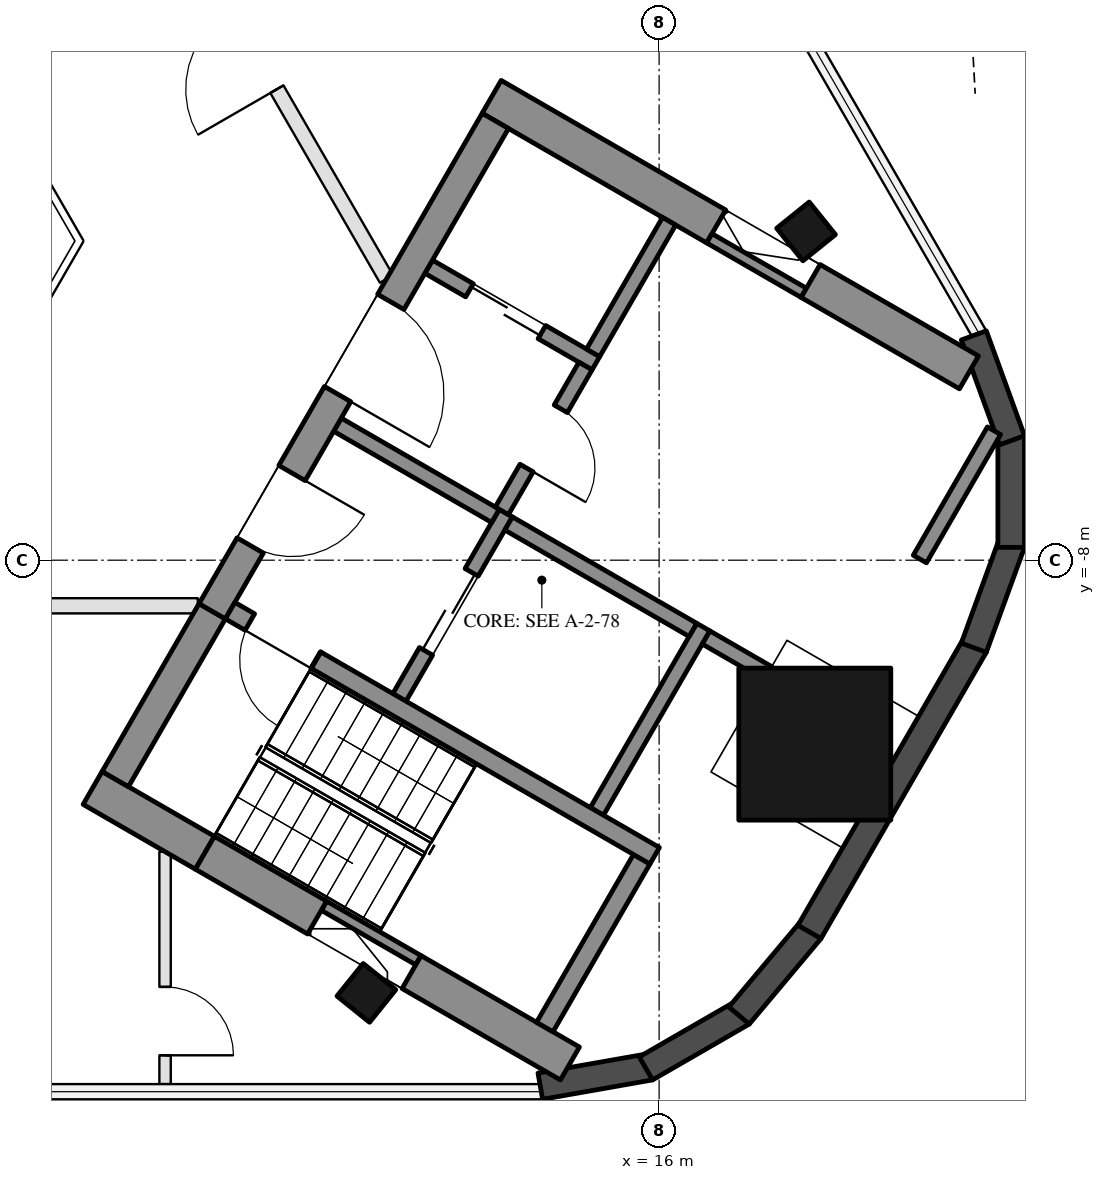
"""IFC4 building model, lengths in metres.
Left out: names, types, materials, properties, quantities, classifications, styles, units other than length and angle.
Written with IfcOpenShell. Run it as: python <this file> out.ifc"""

import sys

from ifc_helpers import new_model, si_unit, direction, frame, frame_2d, origin, origin_2d, place, context, subcontext, project, spatial, rectangle, hollow_rectangle, extrude, boolean, halfspace, element, fill, save


model = new_model("IFC4")
c1 = context("Model", 3, precision=1e-05, world=origin(), true_north=direction((0.0, 1.0)))
c2 = subcontext(c1, "Body", "Model", "MODEL_VIEW")
j1 = project(units=[si_unit("LENGTHUNIT", "METRE"), si_unit("PLANEANGLEUNIT", "RADIAN")], contexts=[c1])
p1 = place(None, origin())
s1 = spatial("IfcSite", under=j1, at=p1, CompositionType="ELEMENT")
p2 = place(p1, origin())
s2 = spatial("IfcBuilding", under=s1, at=p2, CompositionType="ELEMENT")
p3 = place(p2, frame((0.0, 0.0, 331.8)))
s3 = spatial("IfcBuildingStorey", under=s2, at=p3, CompositionType="ELEMENT", Elevation=331.8)
p4 = place(p3, frame((12.148, -13.693, 0.0), z_axis=(-0.069800876117, 0.086709858406, 0.993785307875), x_axis=(0.997556680816, 0.003154583171, 0.069790523453)))
e1 = element("IfcColumn", 1, at=p4, inside=s3, PredefinedType="COLUMN", context=c2, shape_type="SweptSolid", body=[
    boolean("DIFFERENCE", boolean("DIFFERENCE", extrude(hollow_rectangle(XDim=0.55, YDim=0.55, WallThickness=0.025, at=origin_2d()), origin(), (0.0, 0.0, 1.0), 6.541), halfspace(frame((0.0, 0.0, 0.018), z_axis=(0.0, 0.0, 1.0), x_axis=(1.0, 0.0, 0.0)), True)), halfspace(frame((0.0, 0.0, 6.517), z_axis=(0.0, 0.0, 1.0), x_axis=(1.0, 0.0, 0.0)), False)),
])
p5 = place(p3, frame((17.933, -3.674, 0.0), z_axis=(-0.110001598566, 0.017095599641, 0.993784377411), x_axis=(0.496031401637, -0.865495011969, 0.069794217853)))
e2 = element("IfcColumn", 2, at=p5, inside=s3, PredefinedType="COLUMN", context=c2, shape_type="SweptSolid", body=[
    boolean("DIFFERENCE", boolean("DIFFERENCE", extrude(hollow_rectangle(XDim=0.55, YDim=0.55, WallThickness=0.025, at=origin_2d()), origin(), (0.0, 0.0, 1.0), 6.541), halfspace(frame((0.0, 0.0, 0.018), z_axis=(0.0, 0.0, 1.0), x_axis=(1.0, 0.0, 0.0)), True)), halfspace(frame((0.0, 0.0, 6.517), z_axis=(0.0, 0.0, 1.0), x_axis=(1.0, 0.0, 0.0)), False)),
])
p6 = place(p3, frame((18.048, -10.42, 0.0), z_axis=(-0.110162754727, 0.063631378111, 0.991874596504), x_axis=(-0.5001252871, -0.865953057134, 6.661194e-06)))
e3 = element("IfcColumn", 3, at=p6, inside=s3, PredefinedType="COLUMN", context=c2, shape_type="SweptSolid", body=[
    boolean("DIFFERENCE", boolean("DIFFERENCE", extrude(hollow_rectangle(XDim=2.0, YDim=2.0, WallThickness=0.05, at=origin_2d()), origin(), (0.0, 0.0, 1.0), 6.553), halfspace(frame((0.0, 0.0, 0.049), z_axis=(0.0, 0.0, 1.0), x_axis=(1.0, 0.0, 0.0)), True)), halfspace(frame((0.0, 0.0, 6.487), z_axis=(0.0, 0.0, 1.0), x_axis=(1.0, 0.0, 0.0)), False)),
])
p7 = place(p3, frame((14.437, -14.921, 0.0), z_axis=(0.0, 0.0, 1.0), x_axis=(0.984823698616, 0.173557721363, 0.0)))
e4 = element("IfcWall", 4, at=p7, inside=s3, PredefinedType="SOLIDWALL", context=c2, shape_type="SweptSolid", body=[
    extrude(rectangle(XDim=1.469, YDim=0.35, at=frame_2d((0.734, 0.0))), origin(), (0.0, 0.0, 1.0), 6.25),
])
for number, where, z_axis, x_axis in (
    (5, (15.826, -14.687, 0.0), (0.0, 0.0, 1.0), (0.866, 0.5, 0.0)),
    (6, (17.052, -13.991, 0.0), (0.0, 0.0, 1.0), (0.643, 0.766, 0.0)),
):
    element("IfcWall", number, at=place(p3, frame(where, z_axis=z_axis, x_axis=x_axis)), inside=s3, PredefinedType="SOLIDWALL", context=c2, shape_type="SweptSolid", body=[
        extrude(rectangle(XDim=1.469, YDim=0.35, at=frame_2d((0.734, 0.0))), origin(), (0.0, 0.0, 1.0), 6.25),
    ])
p8 = place(p3, frame((17.978, -12.891, 0.0), z_axis=(0.0, 0.0, 1.0), x_axis=(0.500013916395, 0.866017369001, 0.0)))
e7 = element("IfcWall", 7, at=p8, inside=s3, PredefinedType="SOLIDWALL", context=c2, shape_type="SweptSolid", body=[
    extrude(rectangle(XDim=4.351, YDim=0.35, at=frame_2d((2.175, 0.0))), origin(), (0.0, 0.0, 1.0), 6.25),
])
for number, where, z_axis, x_axis in (
    (8, (20.14, -9.151, 0.0), (0.0, 0.0, 1.0), (0.342, 0.94, 0.0)),
    (9, (20.632, -7.831, 0.0), (0.0, 0.0, 1.0), (0.0, 1.0, 0.0)),
    (10, (20.643, -6.422, 0.0), (0.0, 0.0, 1.0), (-0.342, 0.94, 0.0)),
):
    element("IfcWall", number, at=place(p3, frame(where, z_axis=z_axis, x_axis=x_axis)), inside=s3, PredefinedType="SOLIDWALL", context=c2, shape_type="SweptSolid", body=[
        extrude(rectangle(XDim=1.469, YDim=0.35, at=frame_2d((0.734, 0.0))), origin(), (0.0, 0.0, 1.0), 6.25),
    ])
p9 = place(p3, frame((11.59, -12.546, 0.0), z_axis=(0.0, 0.0, 1.0), x_axis=(0.866077922096, -0.499909024581, 0.0)))
e11 = element("IfcWall", 11, at=p9, inside=s3, PredefinedType="SHEAR", context=c2, shape_type="SweptSolid", body=[
    extrude(rectangle(XDim=1.435, YDim=0.14, at=frame_2d((0.717, 0.0))), origin(), (0.0, 0.0, 1.0), 6.25),
])
p10 = place(p3, frame((12.743, -13.419, 0.0), z_axis=(0.0, 0.0, 1.0), x_axis=(0.866055480043, -0.499947902773, 0.0)))
e12 = element("IfcWall", 12, at=p10, inside=s3, PredefinedType="SHEAR", context=c2, shape_type="SweptSolid", body=[
    extrude(rectangle(XDim=2.406, YDim=0.5, at=frame_2d((1.203, 0.0))), origin(), (0.0, 0.0, 1.0), 6.25),
])
p11 = place(p3, frame((13.797, -1.903, 0.0), z_axis=(0.0, 0.0, 1.0), x_axis=(0.866036589769, -0.499980624807, 0.0)))
e13 = element("IfcWall", 13, at=p11, inside=s3, PredefinedType="SHEAR", context=c2, shape_type="SweptSolid", body=[
    extrude(rectangle(XDim=3.411, YDim=0.5, at=frame_2d((1.706, 0.0))), origin(), (0.0, 0.0, 1.0), 6.25),
])
p12 = place(p3, frame((16.66, -3.765, 0.0), z_axis=(0.0, 0.0, 1.0), x_axis=(0.866077922096, -0.499909024581, 0.0)))
e14 = element("IfcWall", 14, at=p12, inside=s3, PredefinedType="SHEAR", context=c2, shape_type="SweptSolid", body=[
    extrude(rectangle(XDim=1.435, YDim=0.14, at=frame_2d((0.717, 0.0))), origin(), (0.0, 0.0, 1.0), 6.25),
])
p13 = place(p3, frame((17.993, -4.326, 0.0), z_axis=(0.0, 0.0, 1.0), x_axis=(0.866030114221, -0.499991841196, 0.0)))
e15 = element("IfcWall", 15, at=p13, inside=s3, PredefinedType="SHEAR", context=c2, shape_type="SweptSolid", body=[
    extrude(rectangle(XDim=2.406, YDim=0.5, at=frame_2d((1.203, 0.0))), origin(), (0.0, 0.0, 1.0), 6.25),
])
p14 = place(p3, frame((14.496, -14.143, 0.0), z_axis=(0.0, 0.0, 1.0), x_axis=(0.500062241894, 0.865989465428, 0.0)))
e16 = element("IfcWall", 16, at=p14, inside=s3, PredefinedType="SHEAR", context=c2, shape_type="SweptSolid", body=[
    extrude(rectangle(XDim=2.55, YDim=0.25, at=frame_2d((1.275, 0.0))), origin(), (0.0, 0.0, 1.0), 6.25),
])
p15 = place(p3, frame((15.181, -11.305, 0.0), z_axis=(0.0, 0.0, 1.0), x_axis=(0.49994636267, 0.866056369097, 0.0)))
e17 = element("IfcWall", 17, at=p15, inside=s3, PredefinedType="SHEAR", context=c2, shape_type="SweptSolid", body=[
    extrude(rectangle(XDim=2.8, YDim=0.2, at=frame_2d((1.4, 0.0))), origin(), (0.0, 0.0, 1.0), 6.25),
])
p16 = place(p3, frame((12.583, -9.805, 0.0), z_axis=(0.0, 0.0, 1.0), x_axis=(0.49994636267, 0.866056369097, 0.0)))
e18 = element("IfcWall", 18, at=p16, inside=s3, PredefinedType="SHEAR", context=c2, shape_type="SweptSolid", body=[
    extrude(rectangle(XDim=2.8, YDim=0.2, at=frame_2d((1.4, 0.0))), origin(), (0.0, 0.0, 1.0), 6.25),
])
p17 = place(p16, frame((0.7, 0.0, 0.0)))
e19 = element("IfcOpeningElement", 19, at=p17, cuts=e18, PredefinedType="OPENING", context=c2, shape_type="SweptSolid", body=[
    extrude(rectangle(XDim=1.2, YDim=2.1, at=frame_2d((0.6, 1.05))), frame((0.0, 0.11, 0.0), z_axis=(0.0, -1.0, 0.0), x_axis=(1.0, 0.0, 0.0)), (0.0, 0.0, 1.0), 0.22),
])
p18 = place(p3, frame((11.768, -6.217, 0.0), z_axis=(0.0, 0.0, 1.0), x_axis=(0.866050077142, -0.499957262057, 0.0)))
e20 = element("IfcWall", 20, at=p18, inside=s3, PredefinedType="SHEAR", context=c2, shape_type="SweptSolid", body=[
    extrude(rectangle(XDim=2.4, YDim=0.2, at=frame_2d((1.2, 0.0))), origin(), (0.0, 0.0, 1.0), 6.25),
])
p19 = place(p3, frame((14.02, -7.517, 0.0), z_axis=(0.0, 0.0, 1.0), x_axis=(0.866034573852, -0.49998411664, 0.0)))
e21 = element("IfcWall", 21, at=p19, inside=s3, PredefinedType="SHEAR", context=c2, shape_type="SweptSolid", body=[
    extrude(rectangle(XDim=2.8, YDim=0.2, at=frame_2d((1.4, 0.0))), origin(), (0.0, 0.0, 1.0), 6.25),
])
p20 = place(p3, frame((12.968, -4.138, 0.0), z_axis=(0.0, 0.0, 1.0), x_axis=(0.866022320763, -0.500005339912, 0.0)))
e22 = element("IfcWall", 22, at=p20, inside=s3, PredefinedType="SHEAR", context=c2, shape_type="SweptSolid", body=[
    extrude(rectangle(XDim=2.54, YDim=0.2, at=frame_2d((1.27, 0.0))), origin(), (0.0, 0.0, 1.0), 6.25),
])
p21 = place(p20, frame((0.62, 0.0, 0.0)))
e23 = element("IfcOpeningElement", 23, at=p21, cuts=e22, PredefinedType="OPENING", context=c2, shape_type="SweptSolid", body=[
    extrude(rectangle(XDim=1.1, YDim=2.1, at=frame_2d((0.55, 1.05))), frame((0.0, 0.11, 0.0), z_axis=(0.0, -1.0, 0.0), x_axis=(1.0, 0.0, 0.0)), (0.0, 0.0, 1.0), 0.22),
])
p22 = place(p3, frame((13.931, -7.35, 0.0), z_axis=(0.0, 0.0, 1.0), x_axis=(0.50002983664, 0.866008176907, 0.0)))
e24 = element("IfcWall", 24, at=p22, inside=s3, PredefinedType="SHEAR", context=c2, shape_type="SweptSolid", body=[
    extrude(rectangle(XDim=2.2, YDim=0.2, at=frame_2d((1.1, 0.0))), origin(), (0.0, 0.0, 1.0), 6.25),
])
p23 = place(p22, frame((0.65, 0.0, 0.0)))
e25 = element("IfcOpeningElement", 25, at=p23, cuts=e24, PredefinedType="OPENING", context=c2, shape_type="SweptSolid", body=[
    extrude(rectangle(XDim=0.9, YDim=2.1, at=frame_2d((0.45, 1.05))), frame((0.0, 0.11, 0.0), z_axis=(0.0, -1.0, 0.0), x_axis=(1.0, 0.0, 0.0)), (0.0, 0.0, 1.0), 0.22),
])
p24 = place(p3, frame((16.618, -9.017, 0.0), z_axis=(0.0, 0.0, 1.0), x_axis=(0.8660774803, -0.499909789979, 0.0)))
e26 = element("IfcWall", 26, at=p24, inside=s3, PredefinedType="SHEAR", context=c2, shape_type="SweptSolid", body=[
    extrude(rectangle(XDim=0.94, YDim=0.2, at=frame_2d((0.47, 0.0))), origin(), (0.0, 0.0, 1.0), 6.25),
])
p25 = place(p3, frame((15.131, -5.272, 0.0), z_axis=(0.0, 0.0, 1.0), x_axis=(0.499972520799, 0.866041268327, 0.0)))
e27 = element("IfcWall", 27, at=p25, inside=s3, PredefinedType="SHEAR", context=c2, shape_type="SweptSolid", body=[
    extrude(rectangle(XDim=2.0, YDim=0.2, at=frame_2d((1.0, 0.0))), origin(), (0.0, 0.0, 1.0), 6.25),
])
p26 = place(p3, frame((19.431, -7.985, 0.0), z_axis=(0.0, 0.0, 1.0), x_axis=(0.49995005938, 0.866054235095, 0.0)))
e28 = element("IfcWall", 28, at=p26, inside=s3, PredefinedType="SHEAR", context=c2, shape_type="SweptSolid", body=[
    extrude(rectangle(XDim=1.95, YDim=0.2, at=frame_2d((0.975, 0.0))), origin(), (0.0, 0.0, 1.0), 6.25),
])
p27 = place(p3, frame((8.547, -10.997, 0.0), z_axis=(0.0, 0.0, 1.0), x_axis=(0.866033076574, -0.499986710104, 0.0)))
e29 = element("IfcWall", 29, at=p27, inside=s3, PredefinedType="SHEAR", context=c2, shape_type="SweptSolid", body=[
    extrude(rectangle(XDim=1.706, YDim=0.5, at=frame_2d((0.853, 0.0))), origin(), (0.0, 0.0, 1.0), 6.25),
])
p28 = place(p3, frame((10.024, -11.85, 0.0), z_axis=(0.0, 0.0, 1.0), x_axis=(0.866040105854, -0.499974534403, 0.0)))
e30 = element("IfcWall", 30, at=p28, inside=s3, PredefinedType="SHEAR", context=c2, shape_type="SweptSolid", body=[
    extrude(rectangle(XDim=1.705, YDim=0.5, at=frame_2d((0.852, 0.0))), origin(), (0.0, 0.0, 1.0), 6.25),
])
p29 = place(p3, frame((8.845, -10.88, 0.0), z_axis=(0.0, 0.0, 1.0), x_axis=(0.499990435942, 0.866030925526, 0.0)))
e31 = element("IfcWall", 31, at=p29, inside=s3, PredefinedType="SHEAR", context=c2, shape_type="SweptSolid", body=[
    extrude(rectangle(XDim=2.55, YDim=0.4, at=frame_2d((1.275, 0.0))), origin(), (0.0, 0.0, 1.0), 6.25),
])
p30 = place(p3, frame((10.12, -8.672, 0.0), z_axis=(0.0, 0.0, 1.0), x_axis=(0.500008956979, 0.866020232408, 0.0)))
e32 = element("IfcWall", 32, at=p30, inside=s3, PredefinedType="SHEAR", context=c2, shape_type="SweptSolid", body=[
    extrude(rectangle(XDim=7.45, YDim=0.4, at=frame_2d((3.725, 0.0))), origin(), (0.0, 0.0, 1.0), 6.25),
])
p31 = place(p30, frame((1.0, 0.0, 0.0)))
e33 = element("IfcOpeningElement", 33, at=p31, cuts=e32, PredefinedType="OPENING", context=c2, shape_type="SweptSolid", body=[
    extrude(rectangle(XDim=1.1, YDim=2.1, at=frame_2d((0.55, 1.05))), frame((0.0, 0.21, 0.0), z_axis=(0.0, -1.0, 0.0), x_axis=(1.0, 0.0, 0.0)), (0.0, 0.0, 1.0), 0.42),
])
p32 = place(p30, frame((3.3, 0.0, 0.0)))
e34 = element("IfcOpeningElement", 34, at=p32, cuts=e32, PredefinedType="OPENING", context=c2, shape_type="SweptSolid", body=[
    extrude(rectangle(XDim=1.4, YDim=2.1, at=frame_2d((0.7, 1.05))), frame((0.0, 0.21, 0.0), z_axis=(0.0, -1.0, 0.0), x_axis=(1.0, 0.0, 0.0)), (0.0, 0.0, 1.0), 0.42),
])
p33 = place(p3, frame((10.356, -8.664, 0.0), z_axis=(0.0, 0.0, 1.0), x_axis=(0.866095317631, -0.499878886109, 0.0)))
e35 = element("IfcWall", 35, at=p33, inside=s3, PredefinedType="SHEAR", context=c2, shape_type="SweptSolid", body=[
    extrude(rectangle(XDim=1.306, YDim=0.25, at=frame_2d((0.653, 0.0))), origin(), (0.0, 0.0, 1.0), 6.25),
])
p34 = place(p33, frame((0.3, 0.0, 0.0)))
e36 = element("IfcOpeningElement", 36, at=p34, cuts=e35, PredefinedType="OPENING", context=c2, shape_type="SweptSolid", body=[
    extrude(rectangle(XDim=1.0, YDim=2.1, at=frame_2d((0.5, 1.05))), frame((0.0, 0.135, 0.0), z_axis=(0.0, -1.0, 0.0), x_axis=(1.0, 0.0, 0.0)), (0.0, 0.0, 1.0), 0.27),
])
p35 = place(p3, frame((11.487, -9.316, 0.0), z_axis=(0.0, 0.0, 1.0), x_axis=(0.866011695431, -0.500023742813, 0.0)))
e37 = element("IfcWall", 37, at=p35, inside=s3, PredefinedType="SHEAR", context=c2, shape_type="SweptSolid", body=[
    extrude(rectangle(XDim=5.144, YDim=0.25, at=frame_2d((2.572, 0.0))), origin(), (0.0, 0.0, 1.0), 6.25),
])
p36 = place(p3, frame((9.5, -14.893, 0.0), z_axis=(0.0, 0.0, 1.0), x_axis=(0.0, 1.0, 0.0)))
e38 = element("IfcWall", 38, at=p36, inside=s3, PredefinedType="PARTITIONING", context=c2, shape_type="SweptSolid", body=[
    extrude(rectangle(XDim=3.058, YDim=0.15, at=frame_2d((1.529, 0.0))), origin(), (0.0, 0.0, 1.0), 6.25),
])
p37 = place(p36, frame((0.379, 0.0, 0.0)))
e39 = element("IfcOpeningElement", 39, at=p37, cuts=e38, PredefinedType="OPENING", context=c2, shape_type="SweptSolid", body=[
    extrude(rectangle(XDim=0.9, YDim=2.1, at=frame_2d((0.45, 1.05))), frame((0.0, 0.085, 0.0), z_axis=(0.0, -1.0, 0.0), x_axis=(1.0, 0.0, 0.0)), (0.0, 0.0, 1.0), 0.17),
])
p38 = place(p3, frame((-9.93, -8.6, 0.0), z_axis=(0.0, 0.0, 1.0), x_axis=(1.0, 0.0, 0.0)))
e40 = element("IfcWall", 40, at=p38, inside=s3, PredefinedType="PARTITIONING", context=c2, shape_type="SweptSolid", body=[
    extrude(rectangle(XDim=19.861, YDim=0.2, at=frame_2d((9.93, 0.0))), origin(), (0.0, 0.0, 1.0), 5.85),
])
p39 = place(p38, frame((1.504, 0.0, 0.0)))
e41 = element("IfcOpeningElement", 41, at=p39, cuts=e40, PredefinedType="OPENING", context=c2, shape_type="SweptSolid", body=[
    extrude(rectangle(XDim=1.5, YDim=2.1, at=frame_2d((0.75, 1.05))), frame((0.0, 0.11, 0.0), z_axis=(0.0, -1.0, 0.0), x_axis=(1.0, 0.0, 0.0)), (0.0, 0.0, 1.0), 0.22),
])
p40 = place(p38, frame((6.013, 0.0, 0.0)))
e42 = element("IfcOpeningElement", 42, at=p40, cuts=e40, PredefinedType="OPENING", context=c2, shape_type="SweptSolid", body=[
    extrude(rectangle(XDim=1.5, YDim=2.1, at=frame_2d((0.75, 1.05))), frame((0.0, 0.11, 0.0), z_axis=(0.0, -1.0, 0.0), x_axis=(1.0, 0.0, 0.0)), (0.0, 0.0, 1.0), 0.22),
])
p41 = place(p38, frame((13.643, 0.0, 0.0)))
e43 = element("IfcOpeningElement", 43, at=p41, cuts=e40, PredefinedType="OPENING", context=c2, shape_type="SweptSolid", body=[
    extrude(rectangle(XDim=1.2, YDim=2.1, at=frame_2d((0.6, 1.05))), frame((0.0, 0.11, 0.0), z_axis=(0.0, -1.0, 0.0), x_axis=(1.0, 0.0, 0.0)), (0.0, 0.0, 1.0), 0.22),
])
p42 = place(p3, frame((12.413, -4.3, 0.0), z_axis=(0.0, 0.0, 1.0), x_axis=(-0.50000478328, 0.866022642139, 0.0)))
e44 = element("IfcWall", 44, at=p42, inside=s3, PredefinedType="PARTITIONING", context=c2, shape_type="SweptSolid", body=[
    extrude(rectangle(XDim=19.861, YDim=0.2, at=frame_2d((9.931, 0.0))), origin(), (0.0, 0.0, 1.0), 5.85),
])
p43 = place(p42, frame((2.884, 0.0, 0.0)))
e45 = element("IfcOpeningElement", 45, at=p43, cuts=e44, PredefinedType="OPENING", context=c2, shape_type="SweptSolid", body=[
    extrude(rectangle(XDim=1.2, YDim=2.1, at=frame_2d((0.6, 1.05))), frame((0.0, 0.11, 0.0), z_axis=(0.0, -1.0, 0.0), x_axis=(1.0, 0.0, 0.0)), (0.0, 0.0, 1.0), 0.22),
])
p44 = place(p42, frame((9.031, 0.0, 0.0)))
e46 = element("IfcOpeningElement", 46, at=p44, cuts=e44, PredefinedType="OPENING", context=c2, shape_type="SweptSolid", body=[
    extrude(rectangle(XDim=1.8, YDim=2.4, at=frame_2d((0.9, 1.2))), frame((0.0, 0.11, 0.0), z_axis=(0.0, -1.0, 0.0), x_axis=(1.0, 0.0, 0.0)), (0.0, 0.0, 1.0), 0.22),
])
p45 = place(p42, frame((15.877, 0.0, 0.0)))
e47 = element("IfcOpeningElement", 47, at=p45, cuts=e44, PredefinedType="OPENING", context=c2, shape_type="SweptSolid", body=[
    extrude(rectangle(XDim=1.0, YDim=2.1, at=frame_2d((0.5, 1.05))), frame((0.0, 0.11, 0.0), z_axis=(0.0, -1.0, 0.0), x_axis=(1.0, 0.0, 0.0)), (0.0, 0.0, 1.0), 0.22),
])
p46 = place(p17, origin())
e48 = element("IfcDoor", 48, at=p46, inside=s3, OperationType="DOUBLE_DOOR_SLIDING", PredefinedType="DOOR", context=c2, shape_type="SweptSolid", body=[
    extrude(rectangle(XDim=1.2, YDim=2.1, at=frame_2d((0.6, 1.05))), frame((0.0, 0.025, 0.0), z_axis=(0.0, -1.0, 0.0), x_axis=(1.0, 0.0, 0.0)), (0.0, 0.0, 1.0), 0.05),
])
fill(e19, e48)
p47 = place(p21, origin())
e49 = element("IfcDoor", 49, at=p47, inside=s3, OperationType="DOUBLE_DOOR_SLIDING", PredefinedType="DOOR", context=c2, shape_type="SweptSolid", body=[
    extrude(rectangle(XDim=1.1, YDim=2.1, at=frame_2d((0.55, 1.05))), frame((0.0, 0.025, 0.0), z_axis=(0.0, -1.0, 0.0), x_axis=(1.0, 0.0, 0.0)), (0.0, 0.0, 1.0), 0.05),
])
fill(e23, e49)
p48 = place(p23, frame((0.9, 0.0, 0.0), z_axis=(0.0, 0.0, 1.0), x_axis=(-1.0, 0.0, 0.0)))
e50 = element("IfcDoor", 50, at=p48, inside=s3, OperationType="SINGLE_SWING_RIGHT", PredefinedType="DOOR", context=c2, shape_type="SweptSolid", body=[
    extrude(rectangle(XDim=0.9, YDim=2.1, at=frame_2d((0.45, 1.05))), frame((0.0, 0.025, 0.0), z_axis=(0.0, -1.0, 0.0), x_axis=(1.0, 0.0, 0.0)), (0.0, 0.0, 1.0), 0.05),
])
fill(e25, e50)
p49 = place(p31, frame((1.1, 0.0, 0.0), z_axis=(0.0, 0.0, 1.0), x_axis=(-1.0, 0.0, 0.0)))
e51 = element("IfcDoor", 51, at=p49, inside=s3, OperationType="SINGLE_SWING_LEFT", PredefinedType="DOOR", context=c2, shape_type="SweptSolid", body=[
    extrude(rectangle(XDim=1.1, YDim=2.1, at=frame_2d((0.55, 1.05))), frame((0.0, 0.025, 0.0), z_axis=(0.0, -1.0, 0.0), x_axis=(1.0, 0.0, 0.0)), (0.0, 0.0, 1.0), 0.05),
])
fill(e33, e51)
p50 = place(p32, frame((1.4, 0.0, 0.0), z_axis=(0.0, 0.0, 1.0), x_axis=(-1.0, 0.0, 0.0)))
e52 = element("IfcDoor", 52, at=p50, inside=s3, OperationType="DOUBLE_DOOR_SINGLE_SWING", PredefinedType="DOOR", context=c2, shape_type="SweptSolid", body=[
    extrude(rectangle(XDim=1.4, YDim=2.1, at=frame_2d((0.7, 1.05))), frame((0.0, 0.025, 0.0), z_axis=(0.0, -1.0, 0.0), x_axis=(1.0, 0.0, 0.0)), (0.0, 0.0, 1.0), 0.05),
])
fill(e34, e52)
p51 = place(p34, frame((1.0, 0.0, 0.0), z_axis=(0.0, 0.0, 1.0), x_axis=(-1.0, 0.0, 0.0)))
e53 = element("IfcDoor", 53, at=p51, inside=s3, OperationType="SINGLE_SWING_LEFT", PredefinedType="DOOR", context=c2, shape_type="SweptSolid", body=[
    extrude(rectangle(XDim=1.0, YDim=2.1, at=frame_2d((0.5, 1.05))), frame((0.0, 0.025, 0.0), z_axis=(0.0, -1.0, 0.0), x_axis=(1.0, 0.0, 0.0)), (0.0, 0.0, 1.0), 0.05),
])
fill(e36, e53)
p52 = place(p43, origin())
e54 = element("IfcDoor", 54, at=p52, inside=s3, OperationType="SINGLE_SWING_LEFT", PredefinedType="DOOR", context=c2, shape_type="SweptSolid", body=[
    extrude(rectangle(XDim=1.2, YDim=2.1, at=frame_2d((0.6, 1.05))), frame((0.0, 0.025, 0.0), z_axis=(0.0, -1.0, 0.0), x_axis=(1.0, 0.0, 0.0)), (0.0, 0.0, 1.0), 0.05),
])
fill(e45, e54)
p53 = place(p37, frame((0.9, 0.0, 0.0), z_axis=(0.0, 0.0, 1.0), x_axis=(-1.0, 0.0, 0.0)))
e55 = element("IfcDoor", 55, at=p53, inside=s3, OperationType="SINGLE_SWING_RIGHT", PredefinedType="DOOR", context=c2, shape_type="SweptSolid", body=[
    extrude(rectangle(XDim=0.9, YDim=2.1, at=frame_2d((0.45, 1.05))), frame((0.0, 0.025, 0.0), z_axis=(0.0, -1.0, 0.0), x_axis=(1.0, 0.0, 0.0)), (0.0, 0.0, 1.0), 0.05),
])
fill(e39, e55)
save(model, sys.argv[1])
